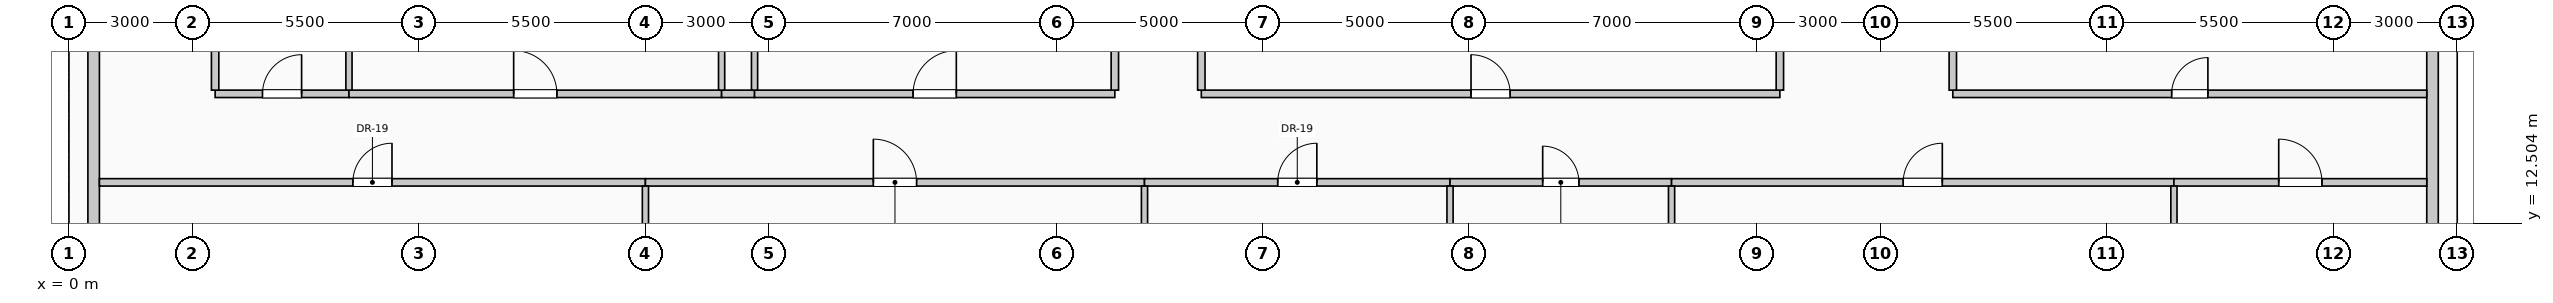
"""IFC4 building model, lengths in metres.
Left out: names, types, materials, properties, quantities, classifications, styles, units other than length and angle.
Written with IfcOpenShell. Run it as: python <this file> out.ifc"""

import sys

from ifc_helpers import new_model, si_unit, direction, frame, frame_2d, origin, place, context, subcontext, project, spatial, rectangle, extrude, element, fill, save


model = new_model("IFC4")
c1 = context("Model", 3, precision=1e-05, world=origin(), true_north=direction((0.0, 1.0)))
c2 = subcontext(c1, "Body", "Model", "MODEL_VIEW")
j1 = project(units=[si_unit("LENGTHUNIT", "METRE"), si_unit("PLANEANGLEUNIT", "RADIAN")], contexts=[c1])
p1 = place(None, origin())
s1 = spatial("IfcSite", under=j1, at=p1, CompositionType="ELEMENT")
p2 = place(p1, origin())
s2 = spatial("IfcBuilding", under=s1, at=p2, CompositionType="ELEMENT")
p3 = place(p2, frame((0.0, 0.0, 108.6)))
s3 = spatial("IfcBuildingStorey", under=s2, at=p3, CompositionType="ELEMENT", Elevation=108.6)
for number, where, z_axis, x_axis in (
    (1, (0.6, 10.445, 0.0), (0.0, 0.0, 1.0), (0.0, 1.0, 0.0)),
    (2, (57.4, 17.555, 0.0), (0.0, 0.0, 1.0), (0.0, -1.0, 0.0)),
):
    element("IfcWall", number, at=place(p3, frame(where, z_axis=z_axis, x_axis=x_axis)), inside=s3, PredefinedType="SOLIDWALL", context=c2, shape_type="SweptSolid", body=[
        extrude(rectangle(XDim=7.11, YDim=0.28, at=frame_2d((3.555, 0.0))), origin(), (0.0, 0.0, 1.0), 2.875),
    ])
p4 = place(p3, frame((0.74, 13.5, 0.0), z_axis=(0.0, 0.0, 1.0), x_axis=(1.0, 0.0, 0.0)))
e3 = element("IfcWall", 3, at=p4, inside=s3, PredefinedType="PARTITIONING", context=c2, shape_type="SweptSolid", body=[
    extrude(rectangle(XDim=13.26, YDim=0.18, at=frame_2d((6.63, 0.0))), origin(), (0.0, 0.0, 1.0), 3.725),
])
p5 = place(p4, frame((6.155, 0.0, 0.0)))
e4 = element("IfcOpeningElement", 4, at=p5, cuts=e3, PredefinedType="OPENING", context=c2, shape_type="SweptSolid", body=[
    extrude(rectangle(XDim=0.95, YDim=2.15, at=frame_2d((0.475, 1.075))), frame((0.0, 0.1, 0.0), z_axis=(0.0, -1.0, 0.0), x_axis=(1.0, 0.0, 0.0)), (0.0, 0.0, 1.0), 0.2),
])
p6 = place(p3, frame((14.0, 13.5, 0.0), z_axis=(0.0, 0.0, 1.0), x_axis=(1.0, 0.0, 0.0)))
e5 = element("IfcWall", 5, at=p6, inside=s3, PredefinedType="PARTITIONING", context=c2, shape_type="SweptSolid", body=[
    extrude(rectangle(XDim=12.12, YDim=0.18, at=frame_2d((6.06, 0.0))), origin(), (0.0, 0.0, 1.0), 3.725),
])
p7 = place(p6, frame((5.535, 0.0, 0.0)))
e6 = element("IfcOpeningElement", 6, at=p7, cuts=e5, PredefinedType="OPENING", context=c2, shape_type="SweptSolid", body=[
    extrude(rectangle(XDim=1.05, YDim=2.15, at=frame_2d((0.525, 1.075))), frame((0.0, 0.1, 0.0), z_axis=(0.0, -1.0, 0.0), x_axis=(1.0, 0.0, 0.0)), (0.0, 0.0, 1.0), 0.2),
])
p8 = place(p3, frame((26.12, 13.5, 0.0), z_axis=(0.0, 0.0, 1.0), x_axis=(1.0, 0.0, 0.0)))
e7 = element("IfcWall", 7, at=p8, inside=s3, PredefinedType="PARTITIONING", context=c2, shape_type="SweptSolid", body=[
    extrude(rectangle(XDim=7.42, YDim=0.18, at=frame_2d((3.71, 0.0))), origin(), (0.0, 0.0, 1.0), 3.725),
])
p9 = place(p8, frame((3.235, 0.0, 0.0)))
e8 = element("IfcOpeningElement", 8, at=p9, cuts=e7, PredefinedType="OPENING", context=c2, shape_type="SweptSolid", body=[
    extrude(rectangle(XDim=0.95, YDim=2.15, at=frame_2d((0.475, 1.075))), frame((0.0, 0.1, 0.0), z_axis=(0.0, -1.0, 0.0), x_axis=(1.0, 0.0, 0.0)), (0.0, 0.0, 1.0), 0.2),
])
p10 = place(p3, frame((33.54, 13.5, 0.0), z_axis=(0.0, 0.0, 1.0), x_axis=(1.0, 0.0, 0.0)))
e9 = element("IfcWall", 9, at=p10, inside=s3, PredefinedType="PARTITIONING", context=c2, shape_type="SweptSolid", body=[
    extrude(rectangle(XDim=5.38, YDim=0.18, at=frame_2d((2.69, 0.0))), origin(), (0.0, 0.0, 1.0), 3.725),
])
p11 = place(p10, frame((2.25, 0.0, 0.0)))
e10 = element("IfcOpeningElement", 10, at=p11, cuts=e9, PredefinedType="OPENING", context=c2, shape_type="SweptSolid", body=[
    extrude(rectangle(XDim=0.88, YDim=2.1, at=frame_2d((0.44, 1.05))), frame((0.0, 0.1, 0.0), z_axis=(0.0, -1.0, 0.0), x_axis=(1.0, 0.0, 0.0)), (0.0, 0.0, 1.0), 0.2),
])
p12 = place(p3, frame((38.92, 13.5, 0.0), z_axis=(0.0, 0.0, 1.0), x_axis=(1.0, 0.0, 0.0)))
e11 = element("IfcWall", 11, at=p12, inside=s3, PredefinedType="PARTITIONING", context=c2, shape_type="SweptSolid", body=[
    extrude(rectangle(XDim=12.2, YDim=0.18, at=frame_2d((6.1, 0.0))), origin(), (0.0, 0.0, 1.0), 3.725),
])
p13 = place(p12, frame((5.625, 0.0, 0.0)))
e12 = element("IfcOpeningElement", 12, at=p13, cuts=e11, PredefinedType="OPENING", context=c2, shape_type="SweptSolid", body=[
    extrude(rectangle(XDim=0.95, YDim=2.15, at=frame_2d((0.475, 1.075))), frame((0.0, 0.1, 0.0), z_axis=(0.0, -1.0, 0.0), x_axis=(1.0, 0.0, 0.0)), (0.0, 0.0, 1.0), 0.2),
])
p14 = place(p3, frame((51.12, 13.5, 0.0), z_axis=(0.0, 0.0, 1.0), x_axis=(1.0, 0.0, 0.0)))
e13 = element("IfcWall", 13, at=p14, inside=s3, PredefinedType="PARTITIONING", context=c2, shape_type="SweptSolid", body=[
    extrude(rectangle(XDim=6.14, YDim=0.18, at=frame_2d((3.07, 0.0))), origin(), (0.0, 0.0, 1.0), 3.725),
])
p15 = place(p14, frame((2.545, 0.0, 0.0)))
e14 = element("IfcOpeningElement", 14, at=p15, cuts=e13, PredefinedType="OPENING", context=c2, shape_type="SweptSolid", body=[
    extrude(rectangle(XDim=1.05, YDim=2.15, at=frame_2d((0.525, 1.075))), frame((0.0, 0.1, 0.0), z_axis=(0.0, -1.0, 0.0), x_axis=(1.0, 0.0, 0.0)), (0.0, 0.0, 1.0), 0.2),
])
p16 = place(p3, frame((3.55, 15.65, 0.0), z_axis=(0.0, 0.0, 1.0), x_axis=(1.0, 0.0, 0.0)))
e15 = element("IfcWall", 15, at=p16, inside=s3, PredefinedType="PARTITIONING", context=c2, shape_type="SweptSolid", body=[
    extrude(rectangle(XDim=3.25, YDim=0.18, at=frame_2d((1.625, 0.0))), origin(), (0.0, 0.0, 1.0), 3.725),
])
p17 = place(p16, frame((1.15, 0.0, 0.0)))
e16 = element("IfcOpeningElement", 16, at=p17, cuts=e15, PredefinedType="OPENING", context=c2, shape_type="SweptSolid", body=[
    extrude(rectangle(XDim=0.95, YDim=2.15, at=frame_2d((0.475, 1.075))), frame((0.0, 0.1, 0.0), z_axis=(0.0, -1.0, 0.0), x_axis=(1.0, 0.0, 0.0)), (0.0, 0.0, 1.0), 0.2),
])
p18 = place(p3, frame((6.8, 15.65, 0.0), z_axis=(0.0, 0.0, 1.0), x_axis=(1.0, 0.0, 0.0)))
e17 = element("IfcWall", 17, at=p18, inside=s3, PredefinedType="PARTITIONING", context=c2, shape_type="SweptSolid", body=[
    extrude(rectangle(XDim=9.05, YDim=0.18, at=frame_2d((4.525, 0.0))), origin(), (0.0, 0.0, 1.0), 3.725),
])
p19 = place(p18, frame((4.0, 0.0, 0.0)))
e18 = element("IfcOpeningElement", 18, at=p19, cuts=e17, PredefinedType="OPENING", context=c2, shape_type="SweptSolid", body=[
    extrude(rectangle(XDim=1.05, YDim=2.15, at=frame_2d((0.525, 1.075))), frame((0.0, 0.1, 0.0), z_axis=(0.0, -1.0, 0.0), x_axis=(1.0, 0.0, 0.0)), (0.0, 0.0, 1.0), 0.2),
])
p20 = place(p3, frame((15.85, 15.65, 0.0), z_axis=(0.0, 0.0, 1.0), x_axis=(1.0, 0.0, 0.0)))
e19 = element("IfcWall", 19, at=p20, inside=s3, PredefinedType="PARTITIONING", context=c2, shape_type="SweptSolid", body=[
    extrude(rectangle(XDim=0.8, YDim=0.18, at=frame_2d((0.4, 0.0))), origin(), (0.0, 0.0, 1.0), 3.725),
])
p21 = place(p3, frame((16.65, 15.65, 0.0), z_axis=(0.0, 0.0, 1.0), x_axis=(1.0, 0.0, 0.0)))
e20 = element("IfcWall", 20, at=p21, inside=s3, PredefinedType="PARTITIONING", context=c2, shape_type="SweptSolid", body=[
    extrude(rectangle(XDim=8.75, YDim=0.18, at=frame_2d((4.375, 0.0))), origin(), (0.0, 0.0, 1.0), 3.725),
])
p22 = place(p21, frame((3.85, 0.0, 0.0)))
e21 = element("IfcOpeningElement", 21, at=p22, cuts=e20, PredefinedType="OPENING", context=c2, shape_type="SweptSolid", body=[
    extrude(rectangle(XDim=1.05, YDim=2.15, at=frame_2d((0.525, 1.075))), frame((0.0, 0.1, 0.0), z_axis=(0.0, -1.0, 0.0), x_axis=(1.0, 0.0, 0.0)), (0.0, 0.0, 1.0), 0.2),
])
p23 = place(p3, frame((27.5, 15.65, 0.0), z_axis=(0.0, 0.0, 1.0), x_axis=(1.0, 0.0, 0.0)))
e22 = element("IfcWall", 22, at=p23, inside=s3, PredefinedType="PARTITIONING", context=c2, shape_type="SweptSolid", body=[
    extrude(rectangle(XDim=14.05, YDim=0.18, at=frame_2d((7.025, 0.0))), origin(), (0.0, 0.0, 1.0), 3.725),
])
p24 = place(p23, frame((6.55, 0.0, 0.0)))
e23 = element("IfcOpeningElement", 23, at=p24, cuts=e22, PredefinedType="OPENING", context=c2, shape_type="SweptSolid", body=[
    extrude(rectangle(XDim=0.95, YDim=2.15, at=frame_2d((0.475, 1.075))), frame((0.0, 0.1, 0.0), z_axis=(0.0, -1.0, 0.0), x_axis=(1.0, 0.0, 0.0)), (0.0, 0.0, 1.0), 0.2),
])
p25 = place(p3, frame((45.75, 15.65, 0.0), z_axis=(0.0, 0.0, 1.0), x_axis=(1.0, 0.0, 0.0)))
e24 = element("IfcWall", 24, at=p25, inside=s3, PredefinedType="PARTITIONING", context=c2, shape_type="SweptSolid", body=[
    extrude(rectangle(XDim=11.51, YDim=0.18, at=frame_2d((5.755, 0.0))), origin(), (0.0, 0.0, 1.0), 3.725),
])
p26 = place(p25, frame((5.315, 0.0, 0.0)))
e25 = element("IfcOpeningElement", 25, at=p26, cuts=e24, PredefinedType="OPENING", context=c2, shape_type="SweptSolid", body=[
    extrude(rectangle(XDim=0.88, YDim=2.1, at=frame_2d((0.44, 1.05))), frame((0.0, 0.1, 0.0), z_axis=(0.0, -1.0, 0.0), x_axis=(1.0, 0.0, 0.0)), (0.0, 0.0, 1.0), 0.2),
])
p27 = place(p3, frame((3.55, 15.74, 0.0), z_axis=(0.0, 0.0, 1.0), x_axis=(0.0, 1.0, 0.0)))
e26 = element("IfcWall", 26, at=p27, inside=s3, PredefinedType="PARTITIONING", context=c2, shape_type="SweptSolid", body=[
    extrude(rectangle(XDim=3.135, YDim=0.18, at=frame_2d((1.567, 0.0))), origin(), (0.0, 0.0, 1.0), 3.725),
])
p28 = place(p3, frame((6.8, 15.74, 0.0), z_axis=(0.0, 0.0, 1.0), x_axis=(0.0, 1.0, 0.0)))
e27 = element("IfcWall", 27, at=p28, inside=s3, PredefinedType="PARTITIONING", context=c2, shape_type="SweptSolid", body=[
    extrude(rectangle(XDim=3.135, YDim=0.15, at=frame_2d((1.567, 0.0))), origin(), (0.0, 0.0, 1.0), 3.725),
])
p29 = place(p3, frame((14.0, 1.175, 0.0), z_axis=(0.0, 0.0, 1.0), x_axis=(0.0, 1.0, 0.0)))
e28 = element("IfcWall", 28, at=p29, inside=s3, PredefinedType="PARTITIONING", context=c2, shape_type="SweptSolid", body=[
    extrude(rectangle(XDim=12.235, YDim=0.15, at=frame_2d((6.117, 0.0))), origin(), (0.0, 0.0, 1.0), 3.725),
])
p30 = place(p3, frame((15.85, 15.74, 0.0), z_axis=(0.0, 0.0, 1.0), x_axis=(0.0, 1.0, 0.0)))
e29 = element("IfcWall", 29, at=p30, inside=s3, PredefinedType="PARTITIONING", context=c2, shape_type="SweptSolid", body=[
    extrude(rectangle(XDim=1.76, YDim=0.15, at=frame_2d((0.88, 0.0))), origin(), (0.0, 0.0, 1.0), 3.725),
])
p31 = place(p3, frame((16.65, 15.74, 0.0), z_axis=(0.0, 0.0, 1.0), x_axis=(0.0, 1.0, 0.0)))
e30 = element("IfcWall", 30, at=p31, inside=s3, PredefinedType="PARTITIONING", context=c2, shape_type="SweptSolid", body=[
    extrude(rectangle(XDim=1.76, YDim=0.15, at=frame_2d((0.88, 0.0))), origin(), (0.0, 0.0, 1.0), 3.07),
])
p32 = place(p3, frame((25.4, 15.74, 0.0), z_axis=(0.0, 0.0, 1.0), x_axis=(0.0, 1.0, 0.0)))
e31 = element("IfcWall", 31, at=p32, inside=s3, PredefinedType="PARTITIONING", context=c2, shape_type="SweptSolid", body=[
    extrude(rectangle(XDim=7.585, YDim=0.18, at=frame_2d((3.792, 0.0))), origin(), (0.0, 0.0, 1.0), 3.725),
])
p33 = place(p3, frame((26.12, 0.74, 0.0), z_axis=(0.0, 0.0, 1.0), x_axis=(0.0, 1.0, 0.0)))
e32 = element("IfcWall", 32, at=p33, inside=s3, PredefinedType="PARTITIONING", context=c2, shape_type="SweptSolid", body=[
    extrude(rectangle(XDim=12.67, YDim=0.15, at=frame_2d((6.335, 0.0))), origin(), (0.0, 0.0, 1.0), 3.725),
])
p34 = place(p3, frame((27.5, 15.74, 0.0), z_axis=(0.0, 0.0, 1.0), x_axis=(0.0, 1.0, 0.0)))
e33 = element("IfcWall", 33, at=p34, inside=s3, PredefinedType="PARTITIONING", context=c2, shape_type="SweptSolid", body=[
    extrude(rectangle(XDim=9.57, YDim=0.18, at=frame_2d((4.785, 0.0))), origin(), (0.0, 0.0, 1.0), 3.725),
])
p35 = place(p3, frame((33.54, 1.3, 0.0), z_axis=(0.0, 0.0, 1.0), x_axis=(0.0, 1.0, 0.0)))
e34 = element("IfcWall", 34, at=p35, inside=s3, PredefinedType="PARTITIONING", context=c2, shape_type="SweptSolid", body=[
    extrude(rectangle(XDim=12.11, YDim=0.15, at=frame_2d((6.055, 0.0))), origin(), (0.0, 0.0, 1.0), 3.725),
])
p36 = place(p3, frame((38.92, 0.74, 0.0), z_axis=(0.0, 0.0, 1.0), x_axis=(0.0, 1.0, 0.0)))
e35 = element("IfcWall", 35, at=p36, inside=s3, PredefinedType="PARTITIONING", context=c2, shape_type="SweptSolid", body=[
    extrude(rectangle(XDim=12.67, YDim=0.15, at=frame_2d((6.335, 0.0))), origin(), (0.0, 0.0, 1.0), 3.725),
])
p37 = place(p3, frame((41.55, 15.74, 0.0), z_axis=(0.0, 0.0, 1.0), x_axis=(0.0, 1.0, 0.0)))
e36 = element("IfcWall", 36, at=p37, inside=s3, PredefinedType="PARTITIONING", context=c2, shape_type="SweptSolid", body=[
    extrude(rectangle(XDim=1.76, YDim=0.18, at=frame_2d((0.88, 0.0))), origin(), (0.0, 0.0, 1.0), 3.07),
])
p38 = place(p3, frame((45.75, 15.74, 0.0), z_axis=(0.0, 0.0, 1.0), x_axis=(0.0, 1.0, 0.0)))
e37 = element("IfcWall", 37, at=p38, inside=s3, PredefinedType="PARTITIONING", context=c2, shape_type="SweptSolid", body=[
    extrude(rectangle(XDim=16.535, YDim=0.18, at=frame_2d((8.268, 0.0))), origin(), (0.0, 0.0, 1.0), 3.725),
])
p39 = place(p3, frame((51.12, 0.74, 0.0), z_axis=(0.0, 0.0, 1.0), x_axis=(0.0, 1.0, 0.0)))
e38 = element("IfcWall", 38, at=p39, inside=s3, PredefinedType="PARTITIONING", context=c2, shape_type="SweptSolid", body=[
    extrude(rectangle(XDim=12.67, YDim=0.15, at=frame_2d((6.335, 0.0))), origin(), (0.0, 0.0, 1.0), 3.725),
])
p40 = place(p5, origin())
e39 = element("IfcDoor", 39, at=p40, inside=s3, OperationType="SINGLE_SWING_RIGHT", PredefinedType="DOOR", context=c2, shape_type="SweptSolid", body=[
    extrude(rectangle(XDim=0.95, YDim=2.15, at=frame_2d((0.475, 1.075))), frame((0.0, 0.025, 0.0), z_axis=(0.0, -1.0, 0.0), x_axis=(1.0, 0.0, 0.0)), (0.0, 0.0, 1.0), 0.05),
])
fill(e4, e39)
p41 = place(p7, origin())
e40 = element("IfcDoor", 40, at=p41, inside=s3, OperationType="SINGLE_SWING_LEFT", PredefinedType="DOOR", context=c2, shape_type="SweptSolid", body=[
    extrude(rectangle(XDim=1.05, YDim=2.15, at=frame_2d((0.525, 1.075))), frame((0.0, 0.025, 0.0), z_axis=(0.0, -1.0, 0.0), x_axis=(1.0, 0.0, 0.0)), (0.0, 0.0, 1.0), 0.05),
])
fill(e6, e40)
p42 = place(p9, origin())
e41 = element("IfcDoor", 41, at=p42, inside=s3, OperationType="SINGLE_SWING_RIGHT", PredefinedType="DOOR", context=c2, shape_type="SweptSolid", body=[
    extrude(rectangle(XDim=0.95, YDim=2.15, at=frame_2d((0.475, 1.075))), frame((0.0, 0.025, 0.0), z_axis=(0.0, -1.0, 0.0), x_axis=(1.0, 0.0, 0.0)), (0.0, 0.0, 1.0), 0.05),
])
fill(e8, e41)
p43 = place(p11, origin())
e42 = element("IfcDoor", 42, at=p43, inside=s3, OperationType="SINGLE_SWING_LEFT", PredefinedType="DOOR", context=c2, shape_type="SweptSolid", body=[
    extrude(rectangle(XDim=0.88, YDim=2.1, at=frame_2d((0.44, 1.05))), frame((0.0, 0.025, 0.0), z_axis=(0.0, -1.0, 0.0), x_axis=(1.0, 0.0, 0.0)), (0.0, 0.0, 1.0), 0.05),
])
fill(e10, e42)
p44 = place(p13, origin())
e43 = element("IfcDoor", 43, at=p44, inside=s3, OperationType="SINGLE_SWING_RIGHT", PredefinedType="DOOR", context=c2, shape_type="SweptSolid", body=[
    extrude(rectangle(XDim=0.95, YDim=2.15, at=frame_2d((0.475, 1.075))), frame((0.0, 0.025, 0.0), z_axis=(0.0, -1.0, 0.0), x_axis=(1.0, 0.0, 0.0)), (0.0, 0.0, 1.0), 0.05),
])
fill(e12, e43)
p45 = place(p15, origin())
e44 = element("IfcDoor", 44, at=p45, inside=s3, OperationType="SINGLE_SWING_LEFT", PredefinedType="DOOR", context=c2, shape_type="SweptSolid", body=[
    extrude(rectangle(XDim=1.05, YDim=2.15, at=frame_2d((0.525, 1.075))), frame((0.0, 0.025, 0.0), z_axis=(0.0, -1.0, 0.0), x_axis=(1.0, 0.0, 0.0)), (0.0, 0.0, 1.0), 0.05),
])
fill(e14, e44)
p46 = place(p17, origin())
e45 = element("IfcDoor", 45, at=p46, inside=s3, OperationType="SINGLE_SWING_RIGHT", PredefinedType="DOOR", context=c2, shape_type="SweptSolid", body=[
    extrude(rectangle(XDim=0.95, YDim=2.15, at=frame_2d((0.475, 1.075))), frame((0.0, 0.025, 0.0), z_axis=(0.0, -1.0, 0.0), x_axis=(1.0, 0.0, 0.0)), (0.0, 0.0, 1.0), 0.05),
])
fill(e16, e45)
p47 = place(p19, origin())
e46 = element("IfcDoor", 46, at=p47, inside=s3, OperationType="SINGLE_SWING_LEFT", PredefinedType="DOOR", context=c2, shape_type="SweptSolid", body=[
    extrude(rectangle(XDim=1.05, YDim=2.15, at=frame_2d((0.525, 1.075))), frame((0.0, 0.025, 0.0), z_axis=(0.0, -1.0, 0.0), x_axis=(1.0, 0.0, 0.0)), (0.0, 0.0, 1.0), 0.05),
])
fill(e18, e46)
p48 = place(p22, origin())
e47 = element("IfcDoor", 47, at=p48, inside=s3, OperationType="SINGLE_SWING_RIGHT", PredefinedType="DOOR", context=c2, shape_type="SweptSolid", body=[
    extrude(rectangle(XDim=1.05, YDim=2.15, at=frame_2d((0.525, 1.075))), frame((0.0, 0.025, 0.0), z_axis=(0.0, -1.0, 0.0), x_axis=(1.0, 0.0, 0.0)), (0.0, 0.0, 1.0), 0.05),
])
fill(e21, e47)
p49 = place(p24, origin())
e48 = element("IfcDoor", 48, at=p49, inside=s3, OperationType="SINGLE_SWING_LEFT", PredefinedType="DOOR", context=c2, shape_type="SweptSolid", body=[
    extrude(rectangle(XDim=0.95, YDim=2.15, at=frame_2d((0.475, 1.075))), frame((0.0, 0.025, 0.0), z_axis=(0.0, -1.0, 0.0), x_axis=(1.0, 0.0, 0.0)), (0.0, 0.0, 1.0), 0.05),
])
fill(e23, e48)
p50 = place(p26, origin())
e49 = element("IfcDoor", 49, at=p50, inside=s3, OperationType="SINGLE_SWING_RIGHT", PredefinedType="DOOR", context=c2, shape_type="SweptSolid", body=[
    extrude(rectangle(XDim=0.88, YDim=2.1, at=frame_2d((0.44, 1.05))), frame((0.0, 0.025, 0.0), z_axis=(0.0, -1.0, 0.0), x_axis=(1.0, 0.0, 0.0)), (0.0, 0.0, 1.0), 0.05),
])
fill(e25, e49)
save(model, sys.argv[1])
